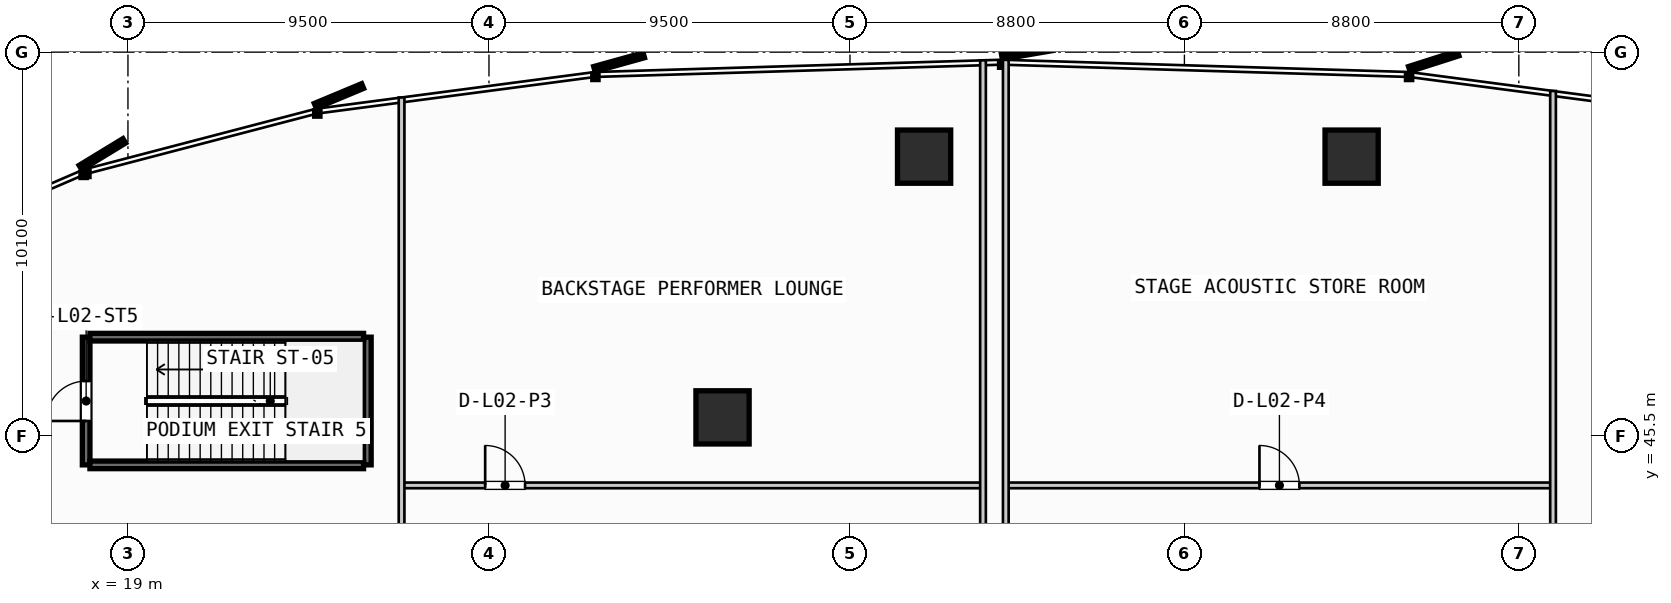
"""IFC4 building model, lengths in metres.
Left out: names, types, materials, properties, quantities, classifications, styles, units other than length and angle.
Written with IfcOpenShell. Run it as: python <this file> out.ifc"""

import sys

from ifc_helpers import new_model, si_unit, direction, frame, frame_2d, origin, origin_2d, place, context, subcontext, project, spatial, rectangle, hollow_rectangle, extrude, source, transform, mapped, element, fill, save


model = new_model("IFC4")
c1 = context("Model", 3, precision=1e-05, world=origin(), true_north=direction((0.0, 1.0)))
c2 = subcontext(c1, "Body", "Model", "MODEL_VIEW")
j1 = project(units=[si_unit("LENGTHUNIT", "METRE"), si_unit("PLANEANGLEUNIT", "RADIAN")], contexts=[c1])
p1 = place(None, origin())
s1 = spatial("IfcSite", under=j1, at=p1, CompositionType="ELEMENT")
p2 = place(p1, origin())
s2 = spatial("IfcBuilding", under=s1, at=p2, CompositionType="ELEMENT")
p3 = place(p2, frame((0.0, 0.0, 10.0)))
s3 = spatial("IfcBuildingStorey", under=s2, at=p3, CompositionType="ELEMENT", Elevation=10.0)
m1 = source(origin(), c2, "Body", "SweptSolid", [
    extrude(hollow_rectangle(XDim=1.4, YDim=1.4, WallThickness=0.05, InnerFilletRadius=0.025, OuterFilletRadius=0.075, at=origin_2d()), origin(), (0.0, 0.0, 1.0), 4.53),
])
for number, where, z_axis, x_axis in (
    (1, (51.2, 52.85, 0.0), (0.0, 0.0, 1.0), (1.0, 0.0, 0.0)),
    (2, (39.95, 52.85, 0.0), (0.0, 0.0, 1.0), (1.0, 0.0, 0.0)),
    (3, (34.646, 45.99, 0.0), (0.0, 0.0, 1.0), (1.0, 0.0, 0.0)),
):
    element("IfcColumn", number, at=place(p3, frame(where, z_axis=z_axis, x_axis=x_axis)), inside=s3, PredefinedType="COLUMN", context=c2, shape_type="MappedRepresentation", body=[
        mapped(m1, transform((0.0, 0.0, 0.0), scale=1.0)),
    ])
p4 = place(p3, frame((17.9, 44.74, 0.0), z_axis=(0.0, 0.0, 1.0), x_axis=(0.0, 1.0, 0.0)))
e4 = element("IfcWall", 4, at=p4, inside=s3, PredefinedType="SHEAR", context=c2, shape_type="SweptSolid", body=[
    extrude(rectangle(XDim=3.36, YDim=0.2, at=frame_2d((1.68, 0.0))), origin(), (0.0, 0.0, 1.0), 4.53),
])
p5 = place(p4, frame((1.155, 0.0, 0.0)))
e5 = element("IfcOpeningElement", 5, at=p5, cuts=e4, PredefinedType="OPENING", context=c2, shape_type="SweptSolid", body=[
    extrude(rectangle(XDim=1.05, YDim=2.15, at=frame_2d((0.525, 1.075))), frame((0.0, 0.11, 0.0), z_axis=(0.0, -1.0, 0.0), x_axis=(1.0, 0.0, 0.0)), (0.0, 0.0, 1.0), 0.22),
])
p6 = place(p3, frame((25.3, 48.1, 0.0), z_axis=(0.0, 0.0, 1.0), x_axis=(0.0, -1.0, 0.0)))
e6 = element("IfcWall", 6, at=p6, inside=s3, PredefinedType="SHEAR", context=c2, shape_type="SweptSolid", body=[
    extrude(rectangle(XDim=3.36, YDim=0.2, at=frame_2d((1.68, 0.0))), origin(), (0.0, 0.0, 1.0), 4.53),
])
for number, where, z_axis, x_axis in (
    (7, (25.2, 44.74, 0.0), (0.0, 0.0, 1.0), (-1.0, 0.0, 0.0)),
    (8, (18.0, 48.1, 0.0), (0.0, 0.0, 1.0), (1.0, 0.0, 0.0)),
):
    element("IfcWall", number, at=place(p3, frame(where, z_axis=z_axis, x_axis=x_axis)), inside=s3, PredefinedType="SHEAR", context=c2, shape_type="SweptSolid", body=[
        extrude(rectangle(XDim=7.2, YDim=0.2, at=frame_2d((3.6, 0.0))), origin(), (0.0, 0.0, 1.0), 4.53),
    ])
p7 = place(p3, frame((26.2, 44.2, 0.0), z_axis=(0.0, 0.0, 1.0), x_axis=(1.0, 0.0, 0.0)))
e9 = element("IfcWall", 9, at=p7, inside=s3, PredefinedType="PARTITIONING", context=c2, shape_type="SweptSolid", body=[
    extrude(rectangle(XDim=15.3, YDim=0.15, at=frame_2d((7.65, 0.0))), origin(), (0.0, 0.0, 1.0), 3.743),
])
p8 = place(p7, frame((2.2, 0.0, 0.0)))
e10 = element("IfcOpeningElement", 10, at=p8, cuts=e9, PredefinedType="OPENING", context=c2, shape_type="SweptSolid", body=[
    extrude(rectangle(XDim=1.05, YDim=2.15, at=frame_2d((0.525, 1.075))), frame((0.0, 0.085, 0.0), z_axis=(0.0, -1.0, 0.0), x_axis=(1.0, 0.0, 0.0)), (0.0, 0.0, 1.0), 0.17),
])
p9 = place(p3, frame((26.2, 42.2, 0.0), z_axis=(0.0, 0.0, 1.0), x_axis=(0.0, 1.0, 0.0)))
e11 = element("IfcWall", 11, at=p9, inside=s3, PredefinedType="PARTITIONING", context=c2, shape_type="SweptSolid", body=[
    extrude(rectangle(XDim=12.207, YDim=0.15, at=frame_2d((6.104, 0.0))), origin(), (0.0, 0.0, 1.0), 3.743),
])
p10 = place(p3, frame((41.5, 42.2, 0.0), z_axis=(0.0, 0.0, 1.0), x_axis=(0.0, 1.0, 0.0)))
e12 = element("IfcWall", 12, at=p10, inside=s3, PredefinedType="PARTITIONING", context=c2, shape_type="SweptSolid", body=[
    extrude(rectangle(XDim=13.185, YDim=0.15, at=frame_2d((6.593, 0.0))), origin(), (0.0, 0.0, 1.0), 3.743),
])
p11 = place(p3, frame((42.1, 44.2, 0.0), z_axis=(0.0, 0.0, 1.0), x_axis=(1.0, 0.0, 0.0)))
e13 = element("IfcWall", 13, at=p11, inside=s3, PredefinedType="PARTITIONING", context=c2, shape_type="SweptSolid", body=[
    extrude(rectangle(XDim=14.4, YDim=0.15, at=frame_2d((7.2, 0.0))), origin(), (0.0, 0.0, 1.0), 3.743),
])
p12 = place(p11, frame((6.675, 0.0, 0.0)))
e14 = element("IfcOpeningElement", 14, at=p12, cuts=e13, PredefinedType="OPENING", context=c2, shape_type="SweptSolid", body=[
    extrude(rectangle(XDim=1.05, YDim=2.15, at=frame_2d((0.525, 1.075))), frame((0.0, 0.085, 0.0), z_axis=(0.0, -1.0, 0.0), x_axis=(1.0, 0.0, 0.0)), (0.0, 0.0, 1.0), 0.17),
])
p13 = place(p3, frame((42.1, 42.2, 0.0), z_axis=(0.0, 0.0, 1.0), x_axis=(0.0, 1.0, 0.0)))
e15 = element("IfcWall", 15, at=p13, inside=s3, PredefinedType="PARTITIONING", context=c2, shape_type="SweptSolid", body=[
    extrude(rectangle(XDim=13.197, YDim=0.15, at=frame_2d((6.599, 0.0))), origin(), (0.0, 0.0, 1.0), 3.743),
])
p14 = place(p3, frame((56.5, 42.2, 0.0), z_axis=(0.0, 0.0, 1.0), x_axis=(0.0, 1.0, 0.0)))
e16 = element("IfcWall", 16, at=p14, inside=s3, PredefinedType="PARTITIONING", context=c2, shape_type="SweptSolid", body=[
    extrude(rectangle(XDim=12.378, YDim=0.15, at=frame_2d((6.189, 0.0))), origin(), (0.0, 0.0, 1.0), 3.743),
])
m2 = source(origin(), c2, "Body", "SweptSolid", [
    extrude(rectangle(XDim=1.05, YDim=2.15, at=frame_2d((0.525, 1.075))), frame((0.0, 0.025, 0.0), z_axis=(0.0, -1.0, 0.0), x_axis=(1.0, 0.0, 0.0)), (0.0, 0.0, 1.0), 0.05),
])
p15 = place(p5, origin())
e17 = element("IfcDoor", 17, at=p15, inside=s3, OperationType="SINGLE_SWING_LEFT", PredefinedType="DOOR", context=c2, shape_type="MappedRepresentation", body=[
    mapped(m2, transform((0.0, 0.0, 0.0), scale=1.0)),
])
fill(e5, e17)
p16 = place(p8, origin())
e18 = element("IfcDoor", 18, at=p16, inside=s3, OperationType="SINGLE_SWING_LEFT", PredefinedType="DOOR", context=c2, shape_type="MappedRepresentation", body=[
    mapped(m2, transform((0.0, 0.0, 0.0), scale=1.0)),
])
fill(e10, e18)
p17 = place(p12, origin())
e19 = element("IfcDoor", 19, at=p17, inside=s3, OperationType="SINGLE_SWING_LEFT", PredefinedType="DOOR", context=c2, shape_type="MappedRepresentation", body=[
    mapped(m2, transform((0.0, 0.0, 0.0), scale=1.0)),
])
fill(e14, e19)
save(model, sys.argv[1])
